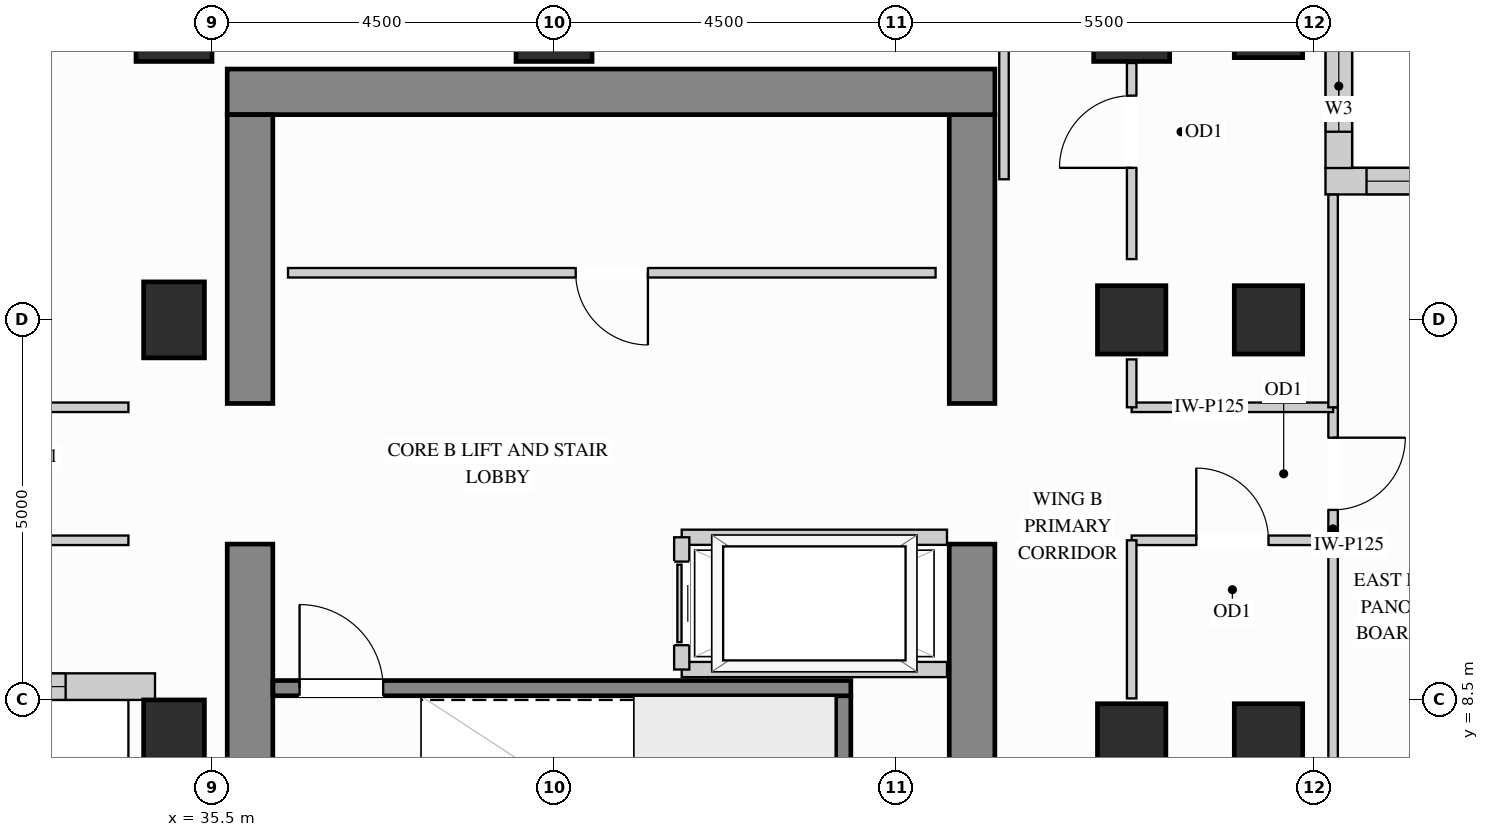
"""IFC4 building model, lengths in metres.
Left out: names, types, materials, properties, quantities, classifications, styles, units other than length and angle.
Written with IfcOpenShell. Run it as: python <this file> out.ifc"""

import sys

from ifc_helpers import new_model, si_unit, direction, frame, frame_2d, origin, origin_2d, place, context, subcontext, project, spatial, rectangle, extrude, source, transform, mapped, element, fill, save


model = new_model("IFC4")
c1 = context("Model", 3, precision=1e-05, world=origin(), true_north=direction((0.0, 1.0)))
c2 = subcontext(c1, "Body", "Model", "MODEL_VIEW")
j1 = project(units=[si_unit("LENGTHUNIT", "METRE"), si_unit("PLANEANGLEUNIT", "RADIAN")], contexts=[c1])
p1 = place(None, origin())
s1 = spatial("IfcSite", under=j1, at=p1, CompositionType="ELEMENT")
p2 = place(p1, origin())
s2 = spatial("IfcBuilding", under=s1, at=p2, CompositionType="ELEMENT")
p3 = place(p2, frame((0.0, 0.0, 189.9)))
s3 = spatial("IfcBuildingStorey", under=s2, at=p3, CompositionType="ELEMENT", Elevation=189.9)
m1 = source(origin(), c2, "Body", "SweptSolid", [
    extrude(rectangle(XDim=0.9, YDim=0.9, at=origin_2d()), origin(), (0.0, 0.0, 1.0), 3.4),
])
for number, where, z_axis, x_axis in (
    (1, (47.6, 13.5, 0.0), (0.0, 0.0, 1.0), (1.0, 0.0, 0.0)),
    (2, (47.6, 8.0, 0.0), (0.0, 0.0, 1.0), (1.0, 0.0, 0.0)),
    (3, (49.4, 13.5, 0.0), (0.0, 0.0, 1.0), (1.0, 0.0, 0.0)),
    (4, (49.4, 17.4, 0.0), (0.0, 0.0, 1.0), (1.0, 0.0, 0.0)),
    (5, (49.4, 8.0, 0.0), (0.0, 0.0, 1.0), (1.0, 0.0, 0.0)),
):
    element("IfcColumn", number, at=place(p3, frame(where, z_axis=z_axis, x_axis=x_axis)), inside=s3, PredefinedType="COLUMN", context=c2, shape_type="MappedRepresentation", body=[
        mapped(m1, transform((0.0, 0.0, 0.0), x_axis=(1.0, 0.0, 0.0), y_axis=(0.0, 1.0, 0.0), z_axis=(0.0, 0.0, 1.0))),
    ])
m2 = source(origin(), c2, "Body", "SweptSolid", [
    extrude(rectangle(XDim=0.8, YDim=1.0, at=origin_2d()), origin(), (0.0, 0.0, 1.0), 3.4),
])
for number, where, z_axis, x_axis in (
    (6, (35.0, 13.5, 0.0), (0.0, 0.0, 1.0), (1.0, 0.0, 0.0)),
    (7, (35.0, 8.0, 0.0), (0.0, 0.0, 1.0), (1.0, 0.0, 0.0)),
):
    element("IfcColumn", number, at=place(p3, frame(where, z_axis=z_axis, x_axis=x_axis)), inside=s3, PredefinedType="COLUMN", context=c2, shape_type="MappedRepresentation", body=[
        mapped(m2, transform((0.0, 0.0, 0.0), x_axis=(1.0, 0.0, 0.0), y_axis=(0.0, 1.0, 0.0), z_axis=(0.0, 0.0, 1.0))),
    ])
m3 = source(origin(), c2, "Body", "SweptSolid", [
    extrude(rectangle(XDim=1.0, YDim=1.0, at=origin_2d()), origin(), (0.0, 0.0, 1.0), 3.4),
])
for number, where, z_axis, x_axis in (
    (8, (35.0, 17.4, 0.0), (0.0, 0.0, 1.0), (1.0, 0.0, 0.0)),
    (9, (40.0, 17.4, 0.0), (0.0, 0.0, 1.0), (1.0, 0.0, 0.0)),
    (10, (47.6, 17.4, 0.0), (0.0, 0.0, 1.0), (1.0, 0.0, 0.0)),
):
    element("IfcColumn", number, at=place(p3, frame(where, z_axis=z_axis, x_axis=x_axis)), inside=s3, PredefinedType="COLUMN", context=c2, shape_type="MappedRepresentation", body=[
        mapped(m3, transform((0.0, 0.0, 0.0), x_axis=(1.0, 0.0, 0.0), y_axis=(0.0, 1.0, 0.0), z_axis=(0.0, 0.0, 1.0))),
    ])
m4 = source(origin(), c2, "Body", "SweptSolid", [
    extrude(rectangle(XDim=5.75, YDim=0.6, at=frame_2d((2.875, 0.0))), origin(), (0.0, 0.0, 1.0), 3.4),
])
p4 = place(p3, frame((45.5, 4.8, 0.0), z_axis=(0.0, 0.0, 1.0), x_axis=(0.0, 1.0, 0.0)))
e11 = element("IfcWall", 11, at=p4, inside=s3, PredefinedType="SHEAR", context=c2, shape_type="MappedRepresentation", body=[
    mapped(m4, transform((0.0, 0.0, 0.0), x_axis=(1.0, 0.0, 0.0), y_axis=(0.0, 1.0, 0.0), z_axis=(0.0, 0.0, 1.0))),
])
m5 = source(origin(), c2, "Body", "SweptSolid", [
    extrude(rectangle(XDim=3.8, YDim=0.6, at=frame_2d((1.9, 0.0))), origin(), (0.0, 0.0, 1.0), 3.4),
])
p5 = place(p3, frame((45.5, 12.4, 0.0), z_axis=(0.0, 0.0, 1.0), x_axis=(0.0, 1.0, 0.0)))
e12 = element("IfcWall", 12, at=p5, inside=s3, PredefinedType="SHEAR", context=c2, shape_type="MappedRepresentation", body=[
    mapped(m5, transform((0.0, 0.0, 0.0), x_axis=(1.0, 0.0, 0.0), y_axis=(0.0, 1.0, 0.0), z_axis=(0.0, 0.0, 1.0))),
])
m6 = source(origin(), c2, "Body", "SweptSolid", [
    extrude(rectangle(XDim=10.1, YDim=0.6, at=frame_2d((5.05, 0.0))), origin(), (0.0, 0.0, 1.0), 3.4),
])
p6 = place(p3, frame((35.7, 16.5, 0.0), z_axis=(0.0, 0.0, 1.0), x_axis=(1.0, 0.0, 0.0)))
e13 = element("IfcWall", 13, at=p6, inside=s3, PredefinedType="SHEAR", context=c2, shape_type="MappedRepresentation", body=[
    mapped(m6, transform((0.0, 0.0, 0.0), x_axis=(1.0, 0.0, 0.0), y_axis=(0.0, 1.0, 0.0), z_axis=(0.0, 0.0, 1.0))),
])
p7 = place(p3, frame((36.0, 4.8, 0.0), z_axis=(0.0, 0.0, 1.0), x_axis=(0.0, 1.0, 0.0)))
e14 = element("IfcWall", 14, at=p7, inside=s3, PredefinedType="SHEAR", context=c2, shape_type="MappedRepresentation", body=[
    mapped(m4, transform((0.0, 0.0, 0.0), x_axis=(1.0, 0.0, 0.0), y_axis=(0.0, 1.0, 0.0), z_axis=(0.0, 0.0, 1.0))),
])
p8 = place(p3, frame((36.0, 12.4, 0.0), z_axis=(0.0, 0.0, 1.0), x_axis=(0.0, 1.0, 0.0)))
e15 = element("IfcWall", 15, at=p8, inside=s3, PredefinedType="SHEAR", context=c2, shape_type="MappedRepresentation", body=[
    mapped(m5, transform((0.0, 0.0, 0.0), x_axis=(1.0, 0.0, 0.0), y_axis=(0.0, 1.0, 0.0), z_axis=(0.0, 0.0, 1.0))),
])
p9 = place(p3, frame((30.898, 8.675, 0.0), z_axis=(0.0, 0.0, 1.0), x_axis=(1.0, 0.0, 0.0)))
e16 = element("IfcWall", 16, at=p9, inside=s3, PredefinedType="SOLIDWALL", context=c2, shape_type="SweptSolid", body=[
    extrude(rectangle(XDim=3.852, YDim=0.35, at=frame_2d((1.926, 0.0))), origin(), (0.0, 0.0, 1.0), 3.385),
])
p10 = place(p9, frame((1.176, 0.0, 0.78)))
e17 = element("IfcOpeningElement", 17, at=p10, cuts=e16, PredefinedType="OPENING", context=c2, shape_type="SweptSolid", body=[
    extrude(rectangle(XDim=1.5, YDim=2.0, at=frame_2d((0.75, 1.0))), frame((0.0, 0.185, 0.0), z_axis=(0.0, -1.0, 0.0), x_axis=(1.0, 0.0, 0.0)), (0.0, 0.0, 1.0), 0.37),
])
p11 = place(p3, frame((53.0, 15.325, 0.0), z_axis=(0.0, 0.0, 1.0), x_axis=(-1.0, 0.0, 0.0)))
e18 = element("IfcWall", 18, at=p11, inside=s3, PredefinedType="SOLIDWALL", context=c2, shape_type="SweptSolid", body=[
    extrude(rectangle(XDim=2.85, YDim=0.35, at=frame_2d((1.425, 0.0))), origin(), (0.0, 0.0, 1.0), 3.385),
])
p12 = place(p11, frame((0.51, 0.0, 0.78)))
e19 = element("IfcOpeningElement", 19, at=p12, cuts=e18, PredefinedType="OPENING", context=c2, shape_type="SweptSolid", body=[
    extrude(rectangle(XDim=1.8, YDim=2.1, at=frame_2d((0.9, 1.05))), frame((0.0, 0.185, 0.0), z_axis=(0.0, -1.0, 0.0), x_axis=(1.0, 0.0, 0.0)), (0.0, 0.0, 1.0), 0.37),
])
p13 = place(p3, frame((50.325, 15.498, 0.0), z_axis=(0.0, 0.0, 1.0), x_axis=(0.0, 1.0, 0.0)))
e20 = element("IfcWall", 20, at=p13, inside=s3, PredefinedType="SOLIDWALL", context=c2, shape_type="SweptSolid", body=[
    extrude(rectangle(XDim=2.154, YDim=0.35, at=frame_2d((1.077, 0.0))), origin(), (0.0, 0.0, 1.0), 3.385),
])
p14 = place(p13, frame((0.477, 0.0, 0.78)))
e21 = element("IfcOpeningElement", 21, at=p14, cuts=e20, PredefinedType="OPENING", context=c2, shape_type="SweptSolid", body=[
    extrude(rectangle(XDim=1.2, YDim=2.1, at=frame_2d((0.6, 1.05))), frame((0.0, 0.185, 0.0), z_axis=(0.0, -1.0, 0.0), x_axis=(1.0, 0.0, 0.0)), (0.0, 0.0, 1.0), 0.37),
])
p15 = place(p3, frame((36.5, 14.12, 0.0), z_axis=(0.0, 0.0, 1.0), x_axis=(1.0, 0.0, 0.0)))
e22 = element("IfcWall", 22, at=p15, inside=s3, PredefinedType="PARTITIONING", context=c2, shape_type="SweptSolid", body=[
    extrude(rectangle(XDim=8.52, YDim=0.125, at=frame_2d((4.26, 0.0))), origin(), (0.0, 0.0, 1.0), 3.385),
])
p16 = place(p15, frame((3.785, 0.0, 0.0)))
e23 = element("IfcOpeningElement", 23, at=p16, cuts=e22, PredefinedType="OPENING", context=c2, shape_type="SweptSolid", body=[
    extrude(rectangle(XDim=0.95, YDim=2.15, at=frame_2d((0.475, 1.075))), frame((0.0, 0.073, 0.0), z_axis=(0.0, -1.0, 0.0), x_axis=(1.0, 0.0, 0.0)), (0.0, 0.0, 1.0), 0.145),
])
p17 = place(p3, frame((50.25, 10.6, 0.0), z_axis=(0.0, 0.0, 1.0), x_axis=(0.0, 1.0, 0.0)))
e24 = element("IfcWall", 24, at=p17, inside=s3, PredefinedType="PARTITIONING", context=c2, shape_type="SweptSolid", body=[
    extrude(rectangle(XDim=1.75, YDim=0.125, at=frame_2d((0.875, 0.0))), origin(), (0.0, 0.0, 1.0), 3.385),
])
p18 = place(p17, frame((0.4, 0.0, 0.0)))
e25 = element("IfcOpeningElement", 25, at=p18, cuts=e24, PredefinedType="OPENING", context=c2, shape_type="SweptSolid", body=[
    extrude(rectangle(XDim=0.95, YDim=2.15, at=frame_2d((0.475, 1.075))), frame((0.0, 0.073, 0.0), z_axis=(0.0, -1.0, 0.0), x_axis=(1.0, 0.0, 0.0)), (0.0, 0.0, 1.0), 0.145),
])
m7 = source(origin(), c2, "Body", "SweptSolid", [
    extrude(rectangle(XDim=2.65, YDim=0.125, at=frame_2d((1.325, 0.0))), origin(), (0.0, 0.0, 1.0), 3.385),
])
p19 = place(p3, frame((47.6, 12.35, 0.0), z_axis=(0.0, 0.0, 1.0), x_axis=(1.0, 0.0, 0.0)))
e26 = element("IfcWall", 26, at=p19, inside=s3, PredefinedType="PARTITIONING", context=c2, shape_type="MappedRepresentation", body=[
    mapped(m7, transform((0.0, 0.0, 0.0), x_axis=(1.0, 0.0, 0.0), y_axis=(0.0, 1.0, 0.0), z_axis=(0.0, 0.0, 1.0))),
])
p20 = place(p3, frame((47.6, 10.6, 0.0), z_axis=(0.0, 0.0, 1.0), x_axis=(1.0, 0.0, 0.0)))
e27 = element("IfcWall", 27, at=p20, inside=s3, PredefinedType="PARTITIONING", context=c2, shape_type="SweptSolid", body=[
    extrude(rectangle(XDim=2.65, YDim=0.125, at=frame_2d((1.325, 0.0))), origin(), (0.0, 0.0, 1.0), 2.773),
])
p21 = place(p20, frame((0.85, 0.0, 0.0)))
e28 = element("IfcOpeningElement", 28, at=p21, cuts=e27, PredefinedType="OPENING", context=c2, shape_type="SweptSolid", body=[
    extrude(rectangle(XDim=0.95, YDim=2.15, at=frame_2d((0.475, 1.075))), frame((0.0, 0.073, 0.0), z_axis=(0.0, -1.0, 0.0), x_axis=(1.0, 0.0, 0.0)), (0.0, 0.0, 1.0), 0.145),
])
m8 = source(origin(), c2, "Body", "SweptSolid", [
    extrude(rectangle(XDim=3.45, YDim=0.125, at=frame_2d((1.725, 0.0))), origin(), (0.0, 0.0, 1.0), 3.385),
])
p22 = place(p3, frame((50.25, 7.15, 0.0), z_axis=(0.0, 0.0, 1.0), x_axis=(0.0, 1.0, 0.0)))
e29 = element("IfcWall", 29, at=p22, inside=s3, PredefinedType="PARTITIONING", context=c2, shape_type="MappedRepresentation", body=[
    mapped(m8, transform((0.0, 0.0, 0.0), x_axis=(1.0, 0.0, 0.0), y_axis=(0.0, 1.0, 0.0), z_axis=(0.0, 0.0, 1.0))),
])
m9 = source(origin(), c2, "Body", "SweptSolid", [
    extrude(rectangle(XDim=2.798, YDim=0.125, at=frame_2d((1.399, 0.0))), origin(), (0.0, 0.0, 1.0), 3.385),
])
p23 = place(p3, frame((50.25, 12.35, 0.0), z_axis=(0.0, 0.0, 1.0), x_axis=(0.0, 1.0, 0.0)))
e30 = element("IfcWall", 30, at=p23, inside=s3, PredefinedType="PARTITIONING", context=c2, shape_type="MappedRepresentation", body=[
    mapped(m9, transform((0.0, 0.0, 0.0), x_axis=(1.0, 0.0, 0.0), y_axis=(0.0, 1.0, 0.0), z_axis=(0.0, 0.0, 1.0))),
])
m10 = source(origin(), c2, "Body", "SweptSolid", [
    extrude(rectangle(XDim=2.08, YDim=0.125, at=frame_2d((1.04, 0.0))), origin(), (0.0, 0.0, 1.0), 2.773),
])
p24 = place(p3, frame((47.6, 8.52, 0.0), z_axis=(0.0, 0.0, 1.0), x_axis=(0.0, 1.0, 0.0)))
e31 = element("IfcWall", 31, at=p24, inside=s3, PredefinedType="PARTITIONING", context=c2, shape_type="MappedRepresentation", body=[
    mapped(m10, transform((0.0, 0.0, 0.0), x_axis=(1.0, 0.0, 0.0), y_axis=(0.0, 1.0, 0.0), z_axis=(0.0, 0.0, 1.0))),
])
p25 = place(p3, frame((47.6, 14.3, 0.0), z_axis=(0.0, 0.0, 1.0), x_axis=(0.0, 1.0, 0.0)))
e32 = element("IfcWall", 32, at=p25, inside=s3, PredefinedType="PARTITIONING", context=c2, shape_type="SweptSolid", body=[
    extrude(rectangle(XDim=2.58, YDim=0.125, at=frame_2d((1.29, 0.0))), origin(), (0.0, 0.0, 1.0), 2.773),
])
p26 = place(p25, frame((1.2, 0.0, 0.0)))
e33 = element("IfcOpeningElement", 33, at=p26, cuts=e32, PredefinedType="OPENING", context=c2, shape_type="SweptSolid", body=[
    extrude(rectangle(XDim=0.95, YDim=2.15, at=frame_2d((0.475, 1.075))), frame((0.0, 0.073, 0.0), z_axis=(0.0, -1.0, 0.0), x_axis=(1.0, 0.0, 0.0)), (0.0, 0.0, 1.0), 0.145),
])
m11 = source(origin(), c2, "Body", "SweptSolid", [
    extrude(rectangle(XDim=0.63, YDim=0.125, at=frame_2d((0.315, 0.0))), origin(), (0.0, 0.0, 1.0), 2.773),
])
p27 = place(p3, frame((47.6, 12.35, 0.0), z_axis=(0.0, 0.0, 1.0), x_axis=(0.0, 1.0, 0.0)))
e34 = element("IfcWall", 34, at=p27, inside=s3, PredefinedType="PARTITIONING", context=c2, shape_type="MappedRepresentation", body=[
    mapped(m11, transform((0.0, 0.0, 0.0), x_axis=(1.0, 0.0, 0.0), y_axis=(0.0, 1.0, 0.0), z_axis=(0.0, 0.0, 1.0))),
])
m12 = source(origin(), c2, "Body", "SweptSolid", [
    extrude(rectangle(XDim=2.298, YDim=0.125, at=frame_2d((1.149, 0.0))), origin(), (0.0, 0.0, 1.0), 3.385),
])
p28 = place(p3, frame((45.92, 15.35, 0.0), z_axis=(0.0, 0.0, 1.0), x_axis=(0.0, 1.0, 0.0)))
e35 = element("IfcWall", 35, at=p28, inside=s3, PredefinedType="PARTITIONING", context=c2, shape_type="MappedRepresentation", body=[
    mapped(m12, transform((0.0, 0.0, 0.0), x_axis=(1.0, 0.0, 0.0), y_axis=(0.0, 1.0, 0.0), z_axis=(0.0, 0.0, 1.0))),
])
p29 = place(p3, frame((29.85, 12.35, 0.0), z_axis=(0.0, 0.0, 1.0), x_axis=(1.0, 0.0, 0.0)))
e36 = element("IfcWall", 36, at=p29, inside=s3, PredefinedType="PARTITIONING", context=c2, shape_type="SweptSolid", body=[
    extrude(rectangle(XDim=4.55, YDim=0.125, at=frame_2d((2.275, 0.0))), origin(), (0.0, 0.0, 1.0), 3.385),
])
p30 = place(p29, frame((1.8, 0.0, 0.0)))
e37 = element("IfcOpeningElement", 37, at=p30, cuts=e36, PredefinedType="OPENING", context=c2, shape_type="SweptSolid", body=[
    extrude(rectangle(XDim=0.95, YDim=2.15, at=frame_2d((0.475, 1.075))), frame((0.0, 0.073, 0.0), z_axis=(0.0, -1.0, 0.0), x_axis=(1.0, 0.0, 0.0)), (0.0, 0.0, 1.0), 0.145),
])
p31 = place(p3, frame((29.85, 10.6, 0.0), z_axis=(0.0, 0.0, 1.0), x_axis=(1.0, 0.0, 0.0)))
e38 = element("IfcWall", 38, at=p31, inside=s3, PredefinedType="PARTITIONING", context=c2, shape_type="SweptSolid", body=[
    extrude(rectangle(XDim=4.55, YDim=0.125, at=frame_2d((2.275, 0.0))), origin(), (0.0, 0.0, 1.0), 3.385),
])
p32 = place(p31, frame((1.8, 0.0, 0.0)))
e39 = element("IfcOpeningElement", 39, at=p32, cuts=e38, PredefinedType="OPENING", context=c2, shape_type="SweptSolid", body=[
    extrude(rectangle(XDim=0.95, YDim=2.15, at=frame_2d((0.475, 1.075))), frame((0.0, 0.073, 0.0), z_axis=(0.0, -1.0, 0.0), x_axis=(1.0, 0.0, 0.0)), (0.0, 0.0, 1.0), 0.145),
])
m13 = source(origin(), c2, "Body", "SweptSolid", [
    extrude(rectangle(XDim=3.49, YDim=0.2, at=frame_2d((1.745, 0.0))), origin(), (0.0, 0.0, 1.0), 3.385),
])
for number, where, z_axis, x_axis in (
    (40, (41.68, 10.64, 0.0), (0.0, 0.0, 1.0), (1.0, 0.0, 0.0)),
    (41, (41.68, 8.9, 0.0), (0.0, 0.0, 1.0), (1.0, 0.0, 0.0)),
):
    element("IfcWall", number, at=place(p3, frame(where, z_axis=z_axis, x_axis=x_axis)), inside=s3, PredefinedType="PARTITIONING", context=c2, shape_type="MappedRepresentation", body=[
        mapped(m13, transform((0.0, 0.0, 0.0), x_axis=(1.0, 0.0, 0.0), y_axis=(0.0, 1.0, 0.0), z_axis=(0.0, 0.0, 1.0))),
    ])
p33 = place(p3, frame((41.68, 8.9, 0.0), z_axis=(0.0, 0.0, 1.0), x_axis=(0.0, 1.0, 0.0)))
e42 = element("IfcWall", 42, at=p33, inside=s3, PredefinedType="PARTITIONING", context=c2, shape_type="SweptSolid", body=[
    extrude(rectangle(XDim=1.74, YDim=0.2, at=frame_2d((0.87, 0.0))), origin(), (0.0, 0.0, 1.0), 3.385),
])
p34 = place(p33, frame((0.32, 0.0, 0.0)))
e43 = element("IfcOpeningElement", 43, at=p34, cuts=e42, PredefinedType="OPENING", context=c2, shape_type="SweptSolid", body=[
    extrude(rectangle(XDim=1.1, YDim=2.2, at=frame_2d((0.55, 1.1))), frame((0.0, 0.11, 0.0), z_axis=(0.0, -1.0, 0.0), x_axis=(1.0, 0.0, 0.0)), (0.0, 0.0, 1.0), 0.22),
])
m14 = source(origin(), c2, "Body", "SweptSolid", [
    extrude(rectangle(XDim=3.753, YDim=0.2, at=frame_2d((1.876, 0.0))), origin(), (0.0, 0.0, 1.0), 3.4),
])
p35 = place(p3, frame((43.805, 4.802, 0.0), z_axis=(0.0, 0.0, 1.0), x_axis=(0.0, 1.0, 0.0)))
e44 = element("IfcWall", 44, at=p35, inside=s3, PredefinedType="SHEAR", context=c2, shape_type="MappedRepresentation", body=[
    mapped(m14, transform((0.0, 0.0, 0.0), x_axis=(1.0, 0.0, 0.0), y_axis=(0.0, 1.0, 0.0), z_axis=(0.0, 0.0, 1.0))),
])
p36 = place(p3, frame((36.302, 8.655, 0.0), z_axis=(0.0, 0.0, 1.0), x_axis=(1.0, 0.0, 0.0)))
e45 = element("IfcWall", 45, at=p36, inside=s3, PredefinedType="SHEAR", context=c2, shape_type="SweptSolid", body=[
    extrude(rectangle(XDim=7.603, YDim=0.2, at=frame_2d((3.802, 0.0))), origin(), (0.0, 0.0, 1.0), 3.4),
])
p37 = place(p36, frame((0.35, 0.0, 0.0)))
e46 = element("IfcOpeningElement", 46, at=p37, cuts=e45, PredefinedType="OPENING", context=c2, shape_type="SweptSolid", body=[
    extrude(rectangle(XDim=1.1, YDim=2.15, at=frame_2d((0.55, 1.075))), frame((0.0, 0.11, 0.0), z_axis=(0.0, -1.0, 0.0), x_axis=(1.0, 0.0, 0.0)), (0.0, 0.0, 1.0), 0.22),
])
m15 = source(origin(), c2, "Body", "SweptSolid", [
    extrude(rectangle(XDim=1.1, YDim=2.2, at=frame_2d((0.55, 1.1))), frame((0.0, 0.025, 0.0), z_axis=(0.0, -1.0, 0.0), x_axis=(1.0, 0.0, 0.0)), (0.0, 0.0, 1.0), 0.05),
])
p38 = place(p34, origin())
e47 = element("IfcDoor", 47, at=p38, inside=s3, OperationType="SLIDING_TO_LEFT", PredefinedType="DOOR", context=c2, shape_type="MappedRepresentation", body=[
    mapped(m15, transform((0.0, 0.0, 0.0), x_axis=(1.0, 0.0, 0.0), y_axis=(0.0, 1.0, 0.0), z_axis=(0.0, 0.0, 1.0))),
])
fill(e43, e47)
m16 = source(origin(), c2, "Body", "SweptSolid", [
    extrude(rectangle(XDim=0.95, YDim=2.15, at=frame_2d((0.475, 1.075))), frame((0.0, 0.025, 0.0), z_axis=(0.0, -1.0, 0.0), x_axis=(1.0, 0.0, 0.0)), (0.0, 0.0, 1.0), 0.05),
])
p39 = place(p16, origin())
e48 = element("IfcDoor", 48, at=p39, inside=s3, OperationType="SINGLE_SWING_RIGHT", PredefinedType="DOOR", context=c2, shape_type="MappedRepresentation", body=[
    mapped(m16, transform((0.0, 0.0, 0.0), x_axis=(1.0, 0.0, 0.0), y_axis=(0.0, 1.0, 0.0), z_axis=(0.0, 0.0, 1.0))),
])
fill(e23, e48)
p40 = place(p21, origin())
e49 = element("IfcDoor", 49, at=p40, inside=s3, OperationType="SINGLE_SWING_LEFT", PredefinedType="DOOR", context=c2, shape_type="MappedRepresentation", body=[
    mapped(m16, transform((0.0, 0.0, 0.0), x_axis=(1.0, 0.0, 0.0), y_axis=(0.0, 1.0, 0.0), z_axis=(0.0, 0.0, 1.0))),
])
fill(e28, e49)
p41 = place(p18, origin())
e50 = element("IfcDoor", 50, at=p41, inside=s3, OperationType="SINGLE_SWING_RIGHT", PredefinedType="DOOR", context=c2, shape_type="MappedRepresentation", body=[
    mapped(m16, transform((0.0, 0.0, 0.0), x_axis=(1.0, 0.0, 0.0), y_axis=(0.0, 1.0, 0.0), z_axis=(0.0, 0.0, 1.0))),
])
fill(e25, e50)
p42 = place(p26, origin())
e51 = element("IfcDoor", 51, at=p42, inside=s3, OperationType="SINGLE_SWING_LEFT", PredefinedType="DOOR", context=c2, shape_type="MappedRepresentation", body=[
    mapped(m16, transform((0.0, 0.0, 0.0), x_axis=(1.0, 0.0, 0.0), y_axis=(0.0, 1.0, 0.0), z_axis=(0.0, 0.0, 1.0))),
])
fill(e33, e51)
m17 = source(origin(), c2, "Body", "SweptSolid", [
    extrude(rectangle(XDim=1.1, YDim=2.15, at=frame_2d((0.55, 1.075))), frame((0.0, 0.025, 0.0), z_axis=(0.0, -1.0, 0.0), x_axis=(1.0, 0.0, 0.0)), (0.0, 0.0, 1.0), 0.05),
])
p43 = place(p37, origin())
e52 = element("IfcDoor", 52, at=p43, inside=s3, OperationType="SINGLE_SWING_LEFT", PredefinedType="DOOR", context=c2, shape_type="MappedRepresentation", body=[
    mapped(m17, transform((0.0, 0.0, 0.0), x_axis=(1.0, 0.0, 0.0), y_axis=(0.0, 1.0, 0.0), z_axis=(0.0, 0.0, 1.0))),
])
fill(e46, e52)
m18 = source(origin(), c2, "Body", "SweptSolid", [
    extrude(rectangle(XDim=1.8, YDim=2.1, at=frame_2d((0.9, 1.05))), frame((0.0, 0.03, 0.0), z_axis=(0.0, -1.0, 0.0), x_axis=(1.0, 0.0, 0.0)), (0.0, 0.0, 1.0), 0.06),
])
p44 = place(p12, origin())
e53 = element("IfcWindow", 53, at=p44, inside=s3, PartitioningType="SINGLE_PANEL", PredefinedType="WINDOW", context=c2, shape_type="MappedRepresentation", body=[
    mapped(m18, transform((0.0, 0.0, 0.0), x_axis=(1.0, 0.0, 0.0), y_axis=(0.0, 1.0, 0.0), z_axis=(0.0, 0.0, 1.0))),
])
fill(e19, e53)
m19 = source(origin(), c2, "Body", "SweptSolid", [
    extrude(rectangle(XDim=1.2, YDim=2.1, at=frame_2d((0.6, 1.05))), frame((0.0, 0.03, 0.0), z_axis=(0.0, -1.0, 0.0), x_axis=(1.0, 0.0, 0.0)), (0.0, 0.0, 1.0), 0.06),
])
p45 = place(p14, origin())
e54 = element("IfcWindow", 54, at=p45, inside=s3, PartitioningType="SINGLE_PANEL", PredefinedType="WINDOW", context=c2, shape_type="MappedRepresentation", body=[
    mapped(m19, transform((0.0, 0.0, 0.0), x_axis=(1.0, 0.0, 0.0), y_axis=(0.0, 1.0, 0.0), z_axis=(0.0, 0.0, 1.0))),
])
fill(e21, e54)
m20 = source(origin(), c2, "Body", "SweptSolid", [
    extrude(rectangle(XDim=1.5, YDim=2.0, at=frame_2d((0.75, 1.0))), frame((0.0, 0.03, 0.0), z_axis=(0.0, -1.0, 0.0), x_axis=(1.0, 0.0, 0.0)), (0.0, 0.0, 1.0), 0.06),
])
p46 = place(p10, origin())
e55 = element("IfcWindow", 55, at=p46, inside=s3, PartitioningType="SINGLE_PANEL", PredefinedType="WINDOW", context=c2, shape_type="MappedRepresentation", body=[
    mapped(m20, transform((0.0, 0.0, 0.0), x_axis=(1.0, 0.0, 0.0), y_axis=(0.0, 1.0, 0.0), z_axis=(0.0, 0.0, 1.0))),
])
fill(e17, e55)
save(model, sys.argv[1])
